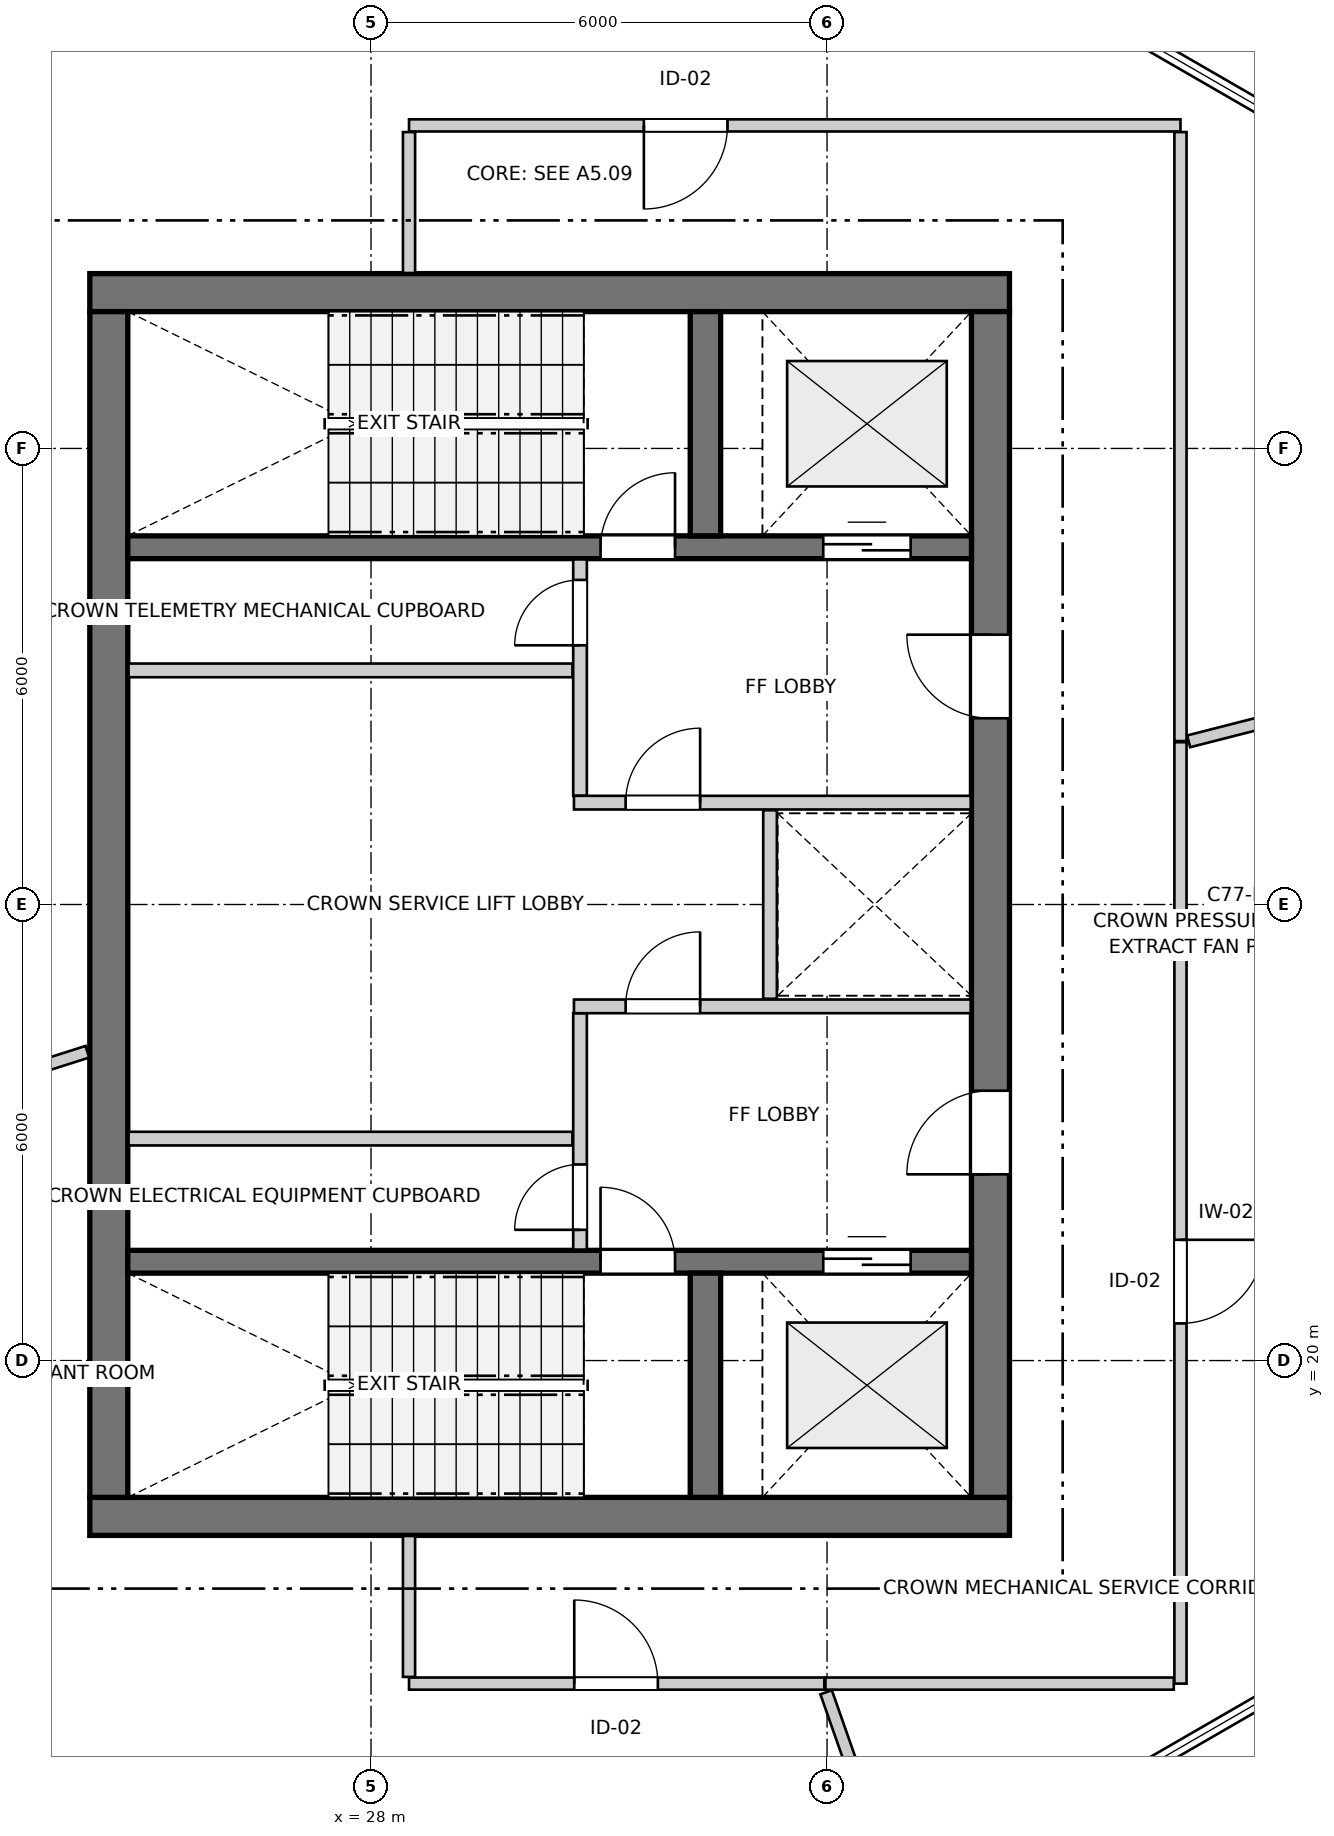
"""IFC4 building model, lengths in metres.
Left out: names, types, materials, properties, quantities, classifications, styles, units other than length and angle.
Written with IfcOpenShell. Run it as: python <this file> out.ifc"""

import sys

from ifc_helpers import new_model, si_unit, direction, frame, frame_2d, origin, place, context, subcontext, project, spatial, rectangle, extrude, source, transform, mapped, element, fill, save


model = new_model("IFC4")
c1 = context("Model", 3, precision=1e-05, world=origin(), true_north=direction((0.0, 1.0)))
c2 = subcontext(c1, "Body", "Model", "MODEL_VIEW")
j1 = project(units=[si_unit("LENGTHUNIT", "METRE"), si_unit("PLANEANGLEUNIT", "RADIAN")], contexts=[c1])
p1 = place(None, origin())
s1 = spatial("IfcSite", under=j1, at=p1, CompositionType="ELEMENT")
p2 = place(p1, origin())
s2 = spatial("IfcBuilding", under=s1, at=p2, CompositionType="ELEMENT")
p3 = place(p2, frame((0.0, 0.0, 257.5)))
s3 = spatial("IfcBuildingStorey", under=s2, at=p3, CompositionType="ELEMENT", Elevation=257.5)
for number, where, z_axis, x_axis in (
    (1, (24.3, 17.95, 0.0), (0.0, 0.0, 1.0), (1.0, 0.0, 0.0)),
    (2, (36.4, 34.05, 0.0), (0.0, 0.0, 1.0), (-1.0, 0.0, 0.0)),
):
    element("IfcWall", number, at=place(p3, frame(where, z_axis=z_axis, x_axis=x_axis)), inside=s3, PredefinedType="SHEAR", context=c2, shape_type="SweptSolid", body=[
        extrude(rectangle(XDim=12.1, YDim=0.5, at=frame_2d((6.05, 0.0))), origin(), (0.0, 0.0, 1.0), 4.05),
    ])
p4 = place(p3, frame((24.55, 33.8, 0.0), z_axis=(0.0, 0.0, 1.0), x_axis=(0.0, -1.0, 0.0)))
e3 = element("IfcWall", 3, at=p4, inside=s3, PredefinedType="SHEAR", context=c2, shape_type="SweptSolid", body=[
    extrude(rectangle(XDim=15.6, YDim=0.5, at=frame_2d((7.8, 0.0))), origin(), (0.0, 0.0, 1.0), 4.05),
])
p5 = place(p3, frame((36.15, 18.2, 0.0), z_axis=(0.0, 0.0, 1.0), x_axis=(0.0, 1.0, 0.0)))
e4 = element("IfcWall", 4, at=p5, inside=s3, PredefinedType="SHEAR", context=c2, shape_type="SweptSolid", body=[
    extrude(rectangle(XDim=15.6, YDim=0.5, at=frame_2d((7.8, 0.0))), origin(), (0.0, 0.0, 1.0), 4.05),
])
p6 = place(p5, frame((4.25, 0.0, 0.0)))
e5 = element("IfcOpeningElement", 5, at=p6, cuts=e4, PredefinedType="OPENING", context=c2, shape_type="SweptSolid", body=[
    extrude(rectangle(XDim=1.1, YDim=2.15, at=frame_2d((0.55, 1.075))), frame((0.0, 0.26, 0.0), z_axis=(0.0, -1.0, 0.0), x_axis=(1.0, 0.0, 0.0)), (0.0, 0.0, 1.0), 0.52),
])
p7 = place(p5, frame((10.25, 0.0, 0.0)))
e6 = element("IfcOpeningElement", 6, at=p7, cuts=e4, PredefinedType="OPENING", context=c2, shape_type="SweptSolid", body=[
    extrude(rectangle(XDim=1.1, YDim=2.15, at=frame_2d((0.55, 1.075))), frame((0.0, 0.26, 0.0), z_axis=(0.0, -1.0, 0.0), x_axis=(1.0, 0.0, 0.0)), (0.0, 0.0, 1.0), 0.52),
])
p8 = place(p3, frame((24.8, 21.3, 0.0), z_axis=(0.0, 0.0, 1.0), x_axis=(1.0, 0.0, 0.0)))
e7 = element("IfcWall", 7, at=p8, inside=s3, PredefinedType="SHEAR", context=c2, shape_type="SweptSolid", body=[
    extrude(rectangle(XDim=11.1, YDim=0.3, at=frame_2d((5.55, 0.0))), origin(), (0.0, 0.0, 1.0), 4.05),
])
p9 = place(p8, frame((6.22, 0.0, 0.0)))
e8 = element("IfcOpeningElement", 8, at=p9, cuts=e7, PredefinedType="OPENING", context=c2, shape_type="SweptSolid", body=[
    extrude(rectangle(XDim=0.98, YDim=2.15, at=frame_2d((0.49, 1.075))), frame((0.0, 0.16, 0.0), z_axis=(0.0, -1.0, 0.0), x_axis=(1.0, 0.0, 0.0)), (0.0, 0.0, 1.0), 0.32),
])
p10 = place(p8, frame((9.15, 0.0, 0.0)))
e9 = element("IfcOpeningElement", 9, at=p10, cuts=e7, PredefinedType="OPENING", context=c2, shape_type="SweptSolid", body=[
    extrude(rectangle(XDim=1.15, YDim=2.15, at=frame_2d((0.575, 1.075))), frame((0.0, 0.16, 0.0), z_axis=(0.0, -1.0, 0.0), x_axis=(1.0, 0.0, 0.0)), (0.0, 0.0, 1.0), 0.32),
])
p11 = place(p3, frame((32.4, 18.2, 0.0), z_axis=(0.0, 0.0, 1.0), x_axis=(0.0, 1.0, 0.0)))
e10 = element("IfcWall", 10, at=p11, inside=s3, PredefinedType="SHEAR", context=c2, shape_type="SweptSolid", body=[
    extrude(rectangle(XDim=2.95, YDim=0.4, at=frame_2d((1.475, 0.0))), origin(), (0.0, 0.0, 1.0), 4.05),
])
p12 = place(p3, frame((24.8, 30.7, 0.0), z_axis=(0.0, 0.0, 1.0), x_axis=(1.0, 0.0, 0.0)))
e11 = element("IfcWall", 11, at=p12, inside=s3, PredefinedType="SHEAR", context=c2, shape_type="SweptSolid", body=[
    extrude(rectangle(XDim=11.1, YDim=0.3, at=frame_2d((5.55, 0.0))), origin(), (0.0, 0.0, 1.0), 4.05),
])
p13 = place(p12, frame((6.22, 0.0, 0.0)))
e12 = element("IfcOpeningElement", 12, at=p13, cuts=e11, PredefinedType="OPENING", context=c2, shape_type="SweptSolid", body=[
    extrude(rectangle(XDim=0.98, YDim=2.15, at=frame_2d((0.49, 1.075))), frame((0.0, 0.16, 0.0), z_axis=(0.0, -1.0, 0.0), x_axis=(1.0, 0.0, 0.0)), (0.0, 0.0, 1.0), 0.32),
])
p14 = place(p12, frame((9.15, 0.0, 0.0)))
e13 = element("IfcOpeningElement", 13, at=p14, cuts=e11, PredefinedType="OPENING", context=c2, shape_type="SweptSolid", body=[
    extrude(rectangle(XDim=1.15, YDim=2.15, at=frame_2d((0.575, 1.075))), frame((0.0, 0.16, 0.0), z_axis=(0.0, -1.0, 0.0), x_axis=(1.0, 0.0, 0.0)), (0.0, 0.0, 1.0), 0.32),
])
p15 = place(p3, frame((32.4, 30.85, 0.0), z_axis=(0.0, 0.0, 1.0), x_axis=(0.0, 1.0, 0.0)))
e14 = element("IfcWall", 14, at=p15, inside=s3, PredefinedType="SHEAR", context=c2, shape_type="SweptSolid", body=[
    extrude(rectangle(XDim=2.95, YDim=0.4, at=frame_2d((1.475, 0.0))), origin(), (0.0, 0.0, 1.0), 4.05),
])
p16 = place(p3, frame((30.75, 21.46, 0.0), z_axis=(0.0, 0.0, 1.0), x_axis=(0.0, 1.0, 0.0)))
e15 = element("IfcWall", 15, at=p16, inside=s3, PredefinedType="PARTITIONING", context=c2, shape_type="SweptSolid", body=[
    extrude(rectangle(XDim=3.11, YDim=0.18, at=frame_2d((1.555, 0.0))), origin(), (0.0, 0.0, 1.0), 4.05),
])
p17 = place(p16, frame((0.26, 0.0, 0.0)))
e16 = element("IfcOpeningElement", 16, at=p17, cuts=e15, PredefinedType="OPENING", context=c2, shape_type="SweptSolid", body=[
    extrude(rectangle(XDim=0.86, YDim=2.05, at=frame_2d((0.43, 1.025))), frame((0.0, 0.1, 0.0), z_axis=(0.0, -1.0, 0.0), x_axis=(1.0, 0.0, 0.0)), (0.0, 0.0, 1.0), 0.2),
])
p18 = place(p3, frame((30.67, 24.66, 0.0), z_axis=(0.0, 0.0, 1.0), x_axis=(1.0, 0.0, 0.0)))
e17 = element("IfcWall", 17, at=p18, inside=s3, PredefinedType="PARTITIONING", context=c2, shape_type="SweptSolid", body=[
    extrude(rectangle(XDim=5.22, YDim=0.18, at=frame_2d((2.61, 0.0))), origin(), (0.0, 0.0, 1.0), 4.05),
])
p19 = place(p18, frame((0.68, 0.0, 0.0)))
e18 = element("IfcOpeningElement", 18, at=p19, cuts=e17, PredefinedType="OPENING", context=c2, shape_type="SweptSolid", body=[
    extrude(rectangle(XDim=0.98, YDim=2.15, at=frame_2d((0.49, 1.075))), frame((0.0, 0.1, 0.0), z_axis=(0.0, -1.0, 0.0), x_axis=(1.0, 0.0, 0.0)), (0.0, 0.0, 1.0), 0.2),
])
p20 = place(p3, frame((30.75, 27.43, 0.0), z_axis=(0.0, 0.0, 1.0), x_axis=(0.0, 1.0, 0.0)))
e19 = element("IfcWall", 19, at=p20, inside=s3, PredefinedType="PARTITIONING", context=c2, shape_type="SweptSolid", body=[
    extrude(rectangle(XDim=3.11, YDim=0.18, at=frame_2d((1.555, 0.0))), origin(), (0.0, 0.0, 1.0), 4.05),
])
p21 = place(p20, frame((1.98, 0.0, 0.0)))
e20 = element("IfcOpeningElement", 20, at=p21, cuts=e19, PredefinedType="OPENING", context=c2, shape_type="SweptSolid", body=[
    extrude(rectangle(XDim=0.86, YDim=2.05, at=frame_2d((0.43, 1.025))), frame((0.0, 0.1, 0.0), z_axis=(0.0, -1.0, 0.0), x_axis=(1.0, 0.0, 0.0)), (0.0, 0.0, 1.0), 0.2),
])
p22 = place(p3, frame((30.67, 27.34, 0.0), z_axis=(0.0, 0.0, 1.0), x_axis=(1.0, 0.0, 0.0)))
e21 = element("IfcWall", 21, at=p22, inside=s3, PredefinedType="PARTITIONING", context=c2, shape_type="SweptSolid", body=[
    extrude(rectangle(XDim=5.22, YDim=0.18, at=frame_2d((2.61, 0.0))), origin(), (0.0, 0.0, 1.0), 4.05),
])
p23 = place(p22, frame((0.68, 0.0, 0.0)))
e22 = element("IfcOpeningElement", 22, at=p23, cuts=e21, PredefinedType="OPENING", context=c2, shape_type="SweptSolid", body=[
    extrude(rectangle(XDim=0.98, YDim=2.15, at=frame_2d((0.49, 1.075))), frame((0.0, 0.1, 0.0), z_axis=(0.0, -1.0, 0.0), x_axis=(1.0, 0.0, 0.0)), (0.0, 0.0, 1.0), 0.2),
])
p24 = place(p3, frame((33.25, 24.76, 0.0), z_axis=(0.0, 0.0, 1.0), x_axis=(0.0, 1.0, 0.0)))
e23 = element("IfcWall", 23, at=p24, inside=s3, PredefinedType="PARTITIONING", context=c2, shape_type="SweptSolid", body=[
    extrude(rectangle(XDim=2.48, YDim=0.18, at=frame_2d((1.24, 0.0))), origin(), (0.0, 0.0, 1.0), 4.05),
])
for number, where, z_axis, x_axis in (
    (24, (24.81, 22.92, 0.0), (0.0, 0.0, 1.0), (1.0, 0.0, 0.0)),
    (25, (24.81, 29.08, 0.0), (0.0, 0.0, 1.0), (1.0, 0.0, 0.0)),
):
    element("IfcWall", number, at=place(p3, frame(where, z_axis=z_axis, x_axis=x_axis)), inside=s3, PredefinedType="PARTITIONING", context=c2, shape_type="SweptSolid", body=[
        extrude(rectangle(XDim=5.84, YDim=0.18, at=frame_2d((2.92, 0.0))), origin(), (0.0, 0.0, 1.0), 4.05),
    ])
p25 = place(p3, frame((38.65, 28.135, 0.0), z_axis=(0.0, 0.0, 1.0), x_axis=(0.0, -1.0, 0.0)))
e26 = element("IfcWall", 26, at=p25, inside=s3, PredefinedType="PARTITIONING", context=c2, shape_type="SweptSolid", body=[
    extrude(rectangle(XDim=12.385, YDim=0.16, at=frame_2d((6.192, 0.0))), origin(), (0.0, 0.0, 1.0), 4.05),
])
p26 = place(p25, frame((6.546, 0.0, 0.0)))
e27 = element("IfcOpeningElement", 27, at=p26, cuts=e26, PredefinedType="OPENING", context=c2, shape_type="SweptSolid", body=[
    extrude(rectangle(XDim=1.1, YDim=2.15, at=frame_2d((0.55, 1.075))), frame((0.0, 0.09, 0.0), z_axis=(0.0, -1.0, 0.0), x_axis=(1.0, 0.0, 0.0)), (0.0, 0.0, 1.0), 0.18),
])
p27 = place(p3, frame((38.65, 36.25, 0.0), z_axis=(0.0, 0.0, 1.0), x_axis=(-1.0, 0.0, 0.0)))
e28 = element("IfcWall", 28, at=p27, inside=s3, PredefinedType="PARTITIONING", context=c2, shape_type="SweptSolid", body=[
    extrude(rectangle(XDim=10.15, YDim=0.16, at=frame_2d((5.075, 0.0))), origin(), (0.0, 0.0, 1.0), 4.05),
])
p28 = place(p27, frame((5.96, 0.0, 0.0)))
e29 = element("IfcOpeningElement", 29, at=p28, cuts=e28, PredefinedType="OPENING", context=c2, shape_type="SweptSolid", body=[
    extrude(rectangle(XDim=1.1, YDim=2.15, at=frame_2d((0.55, 1.075))), frame((0.0, 0.09, 0.0), z_axis=(0.0, -1.0, 0.0), x_axis=(1.0, 0.0, 0.0)), (0.0, 0.0, 1.0), 0.18),
])
p29 = place(p3, frame((28.5, 15.75, 0.0), z_axis=(0.0, 0.0, 1.0), x_axis=(1.0, 0.0, 0.0)))
e30 = element("IfcWall", 30, at=p29, inside=s3, PredefinedType="PARTITIONING", context=c2, shape_type="SweptSolid", body=[
    extrude(rectangle(XDim=5.464, YDim=0.16, at=frame_2d((2.732, 0.0))), origin(), (0.0, 0.0, 1.0), 4.05),
])
p30 = place(p29, frame((2.174, 0.0, 0.0)))
e31 = element("IfcOpeningElement", 31, at=p30, cuts=e30, PredefinedType="OPENING", context=c2, shape_type="SweptSolid", body=[
    extrude(rectangle(XDim=1.1, YDim=2.15, at=frame_2d((0.55, 1.075))), frame((0.0, 0.09, 0.0), z_axis=(0.0, -1.0, 0.0), x_axis=(1.0, 0.0, 0.0)), (0.0, 0.0, 1.0), 0.18),
])
p31 = place(p3, frame((14.979, 21.103, 0.0), z_axis=(0.0, 0.0, 1.0), x_axis=(0.952804016236, 0.303586077818, 0.0)))
e32 = element("IfcWall", 32, at=p31, inside=s3, PredefinedType="PARTITIONING", context=c2, shape_type="SweptSolid", body=[
    extrude(rectangle(XDim=9.749, YDim=0.16, at=frame_2d((4.875, 0.0))), origin(), (0.0, 0.0, 1.0), 3.318),
])
p32 = place(p3, frame((38.65, 28.15, 0.0), z_axis=(0.0, 0.0, 1.0), x_axis=(0.0, 1.0, 0.0)))
e33 = element("IfcWall", 33, at=p32, inside=s3, PredefinedType="PARTITIONING", context=c2, shape_type="SweptSolid", body=[
    extrude(rectangle(XDim=8.012, YDim=0.16, at=frame_2d((4.006, 0.0))), origin(), (0.0, 0.0, 1.0), 4.05),
])
p33 = place(p3, frame((33.979, 15.75, 0.0), z_axis=(0.0, 0.0, 1.0), x_axis=(1.0, 0.0, 0.0)))
e34 = element("IfcWall", 34, at=p33, inside=s3, PredefinedType="PARTITIONING", context=c2, shape_type="SweptSolid", body=[
    extrude(rectangle(XDim=4.583, YDim=0.16, at=frame_2d((2.292, 0.0))), origin(), (0.0, 0.0, 1.0), 4.05),
])
p34 = place(p3, frame((33.988, 15.636, 0.0), z_axis=(0.0, 0.0, 1.0), x_axis=(0.331108156221, -0.943592808834, 0.0)))
e35 = element("IfcWall", 35, at=p34, inside=s3, PredefinedType="PARTITIONING", context=c2, shape_type="SweptSolid", body=[
    extrude(rectangle(XDim=2.985, YDim=0.16, at=frame_2d((1.492, 0.0))), origin(), (0.0, 0.0, 1.0), 4.05),
])
p35 = place(p3, frame((38.758, 28.146, 0.0), z_axis=(0.0, 0.0, 1.0), x_axis=(0.96888022142, 0.247530031594, 0.0)))
e36 = element("IfcWall", 36, at=p35, inside=s3, PredefinedType="PARTITIONING", context=c2, shape_type="SweptSolid", body=[
    extrude(rectangle(XDim=2.724, YDim=0.16, at=frame_2d((1.362, 0.0))), origin(), (0.0, 0.0, 1.0), 4.05),
])
for number, where, z_axis, x_axis in (
    (37, (28.5, 34.308, 0.0), (0.0, 0.0, 1.0), (0.0, 1.0, 0.0)),
    (38, (28.5, 15.838, 0.0), (0.0, 0.0, 1.0), (0.0, 1.0, 0.0)),
):
    element("IfcWall", number, at=place(p3, frame(where, z_axis=z_axis, x_axis=x_axis)), inside=s3, PredefinedType="PARTITIONING", context=c2, shape_type="SweptSolid", body=[
        extrude(rectangle(XDim=1.854, YDim=0.16, at=frame_2d((0.927, 0.0))), origin(), (0.0, 0.0, 1.0), 4.05),
    ])
m1 = source(origin(), c2, "Body", "SweptSolid", [
    extrude(rectangle(XDim=0.98, YDim=2.15, at=frame_2d((0.49, 1.075))), frame((0.0, 0.025, 0.0), z_axis=(0.0, -1.0, 0.0), x_axis=(1.0, 0.0, 0.0)), (0.0, 0.0, 1.0), 0.05),
])
p36 = place(p9, origin())
e39 = element("IfcDoor", 39, at=p36, inside=s3, OperationType="SINGLE_SWING_LEFT", PredefinedType="DOOR", context=c2, shape_type="MappedRepresentation", body=[
    mapped(m1, transform((0.0, 0.0, 0.0), x_axis=(1.0, 0.0, 0.0), y_axis=(0.0, 1.0, 0.0), z_axis=(0.0, 0.0, 1.0), scale=1.0)),
])
fill(e8, e39)
m2 = source(origin(), c2, "Body", "SweptSolid", [
    extrude(rectangle(XDim=1.15, YDim=2.15, at=frame_2d((0.575, 1.075))), frame((0.0, 0.025, 0.0), z_axis=(0.0, -1.0, 0.0), x_axis=(1.0, 0.0, 0.0)), (0.0, 0.0, 1.0), 0.05),
])
p37 = place(p10, origin())
e40 = element("IfcDoor", 40, at=p37, inside=s3, OperationType="DOUBLE_DOOR_SLIDING", PredefinedType="DOOR", context=c2, shape_type="MappedRepresentation", body=[
    mapped(m2, transform((0.0, 0.0, 0.0), x_axis=(1.0, 0.0, 0.0), y_axis=(0.0, 1.0, 0.0), z_axis=(0.0, 0.0, 1.0), scale=1.0)),
])
fill(e9, e40)
p38 = place(p13, origin())
e41 = element("IfcDoor", 41, at=p38, inside=s3, OperationType="SINGLE_SWING_RIGHT", PredefinedType="DOOR", context=c2, shape_type="MappedRepresentation", body=[
    mapped(m1, transform((0.0, 0.0, 0.0), x_axis=(1.0, 0.0, 0.0), y_axis=(0.0, 1.0, 0.0), z_axis=(0.0, 0.0, 1.0), scale=1.0)),
])
fill(e12, e41)
p39 = place(p14, origin())
e42 = element("IfcDoor", 42, at=p39, inside=s3, OperationType="DOUBLE_DOOR_SLIDING", PredefinedType="DOOR", context=c2, shape_type="MappedRepresentation", body=[
    mapped(m2, transform((0.0, 0.0, 0.0), x_axis=(1.0, 0.0, 0.0), y_axis=(0.0, 1.0, 0.0), z_axis=(0.0, 0.0, 1.0), scale=1.0)),
])
fill(e13, e42)
m3 = source(origin(), c2, "Body", "SweptSolid", [
    extrude(rectangle(XDim=1.1, YDim=2.15, at=frame_2d((0.55, 1.075))), frame((0.0, 0.025, 0.0), z_axis=(0.0, -1.0, 0.0), x_axis=(1.0, 0.0, 0.0)), (0.0, 0.0, 1.0), 0.05),
])
p40 = place(p6, origin())
e43 = element("IfcDoor", 43, at=p40, inside=s3, OperationType="SINGLE_SWING_LEFT", PredefinedType="DOOR", context=c2, shape_type="MappedRepresentation", body=[
    mapped(m3, transform((0.0, 0.0, 0.0), x_axis=(1.0, 0.0, 0.0), y_axis=(0.0, 1.0, 0.0), z_axis=(0.0, 0.0, 1.0), scale=1.0)),
])
fill(e5, e43)
p41 = place(p7, origin())
e44 = element("IfcDoor", 44, at=p41, inside=s3, OperationType="SINGLE_SWING_RIGHT", PredefinedType="DOOR", context=c2, shape_type="MappedRepresentation", body=[
    mapped(m3, transform((0.0, 0.0, 0.0), x_axis=(1.0, 0.0, 0.0), y_axis=(0.0, 1.0, 0.0), z_axis=(0.0, 0.0, 1.0), scale=1.0)),
])
fill(e6, e44)
m4 = source(origin(), c2, "Body", "SweptSolid", [
    extrude(rectangle(XDim=0.86, YDim=2.05, at=frame_2d((0.43, 1.025))), frame((0.0, 0.025, 0.0), z_axis=(0.0, -1.0, 0.0), x_axis=(1.0, 0.0, 0.0)), (0.0, 0.0, 1.0), 0.05),
])
p42 = place(p17, origin())
e45 = element("IfcDoor", 45, at=p42, inside=s3, OperationType="SINGLE_SWING_LEFT", PredefinedType="DOOR", context=c2, shape_type="MappedRepresentation", body=[
    mapped(m4, transform((0.0, 0.0, 0.0), x_axis=(1.0, 0.0, 0.0), y_axis=(0.0, 1.0, 0.0), z_axis=(0.0, 0.0, 1.0), scale=1.0)),
])
fill(e16, e45)
p43 = place(p19, origin())
e46 = element("IfcDoor", 46, at=p43, inside=s3, OperationType="SINGLE_SWING_RIGHT", PredefinedType="DOOR", context=c2, shape_type="MappedRepresentation", body=[
    mapped(m1, transform((0.0, 0.0, 0.0), x_axis=(1.0, 0.0, 0.0), y_axis=(0.0, 1.0, 0.0), z_axis=(0.0, 0.0, 1.0), scale=1.0)),
])
fill(e18, e46)
p44 = place(p21, origin())
e47 = element("IfcDoor", 47, at=p44, inside=s3, OperationType="SINGLE_SWING_LEFT", PredefinedType="DOOR", context=c2, shape_type="MappedRepresentation", body=[
    mapped(m4, transform((0.0, 0.0, 0.0), x_axis=(1.0, 0.0, 0.0), y_axis=(0.0, 1.0, 0.0), z_axis=(0.0, 0.0, 1.0), scale=1.0)),
])
fill(e20, e47)
p45 = place(p23, origin())
e48 = element("IfcDoor", 48, at=p45, inside=s3, OperationType="SINGLE_SWING_RIGHT", PredefinedType="DOOR", context=c2, shape_type="MappedRepresentation", body=[
    mapped(m1, transform((0.0, 0.0, 0.0), x_axis=(1.0, 0.0, 0.0), y_axis=(0.0, 1.0, 0.0), z_axis=(0.0, 0.0, 1.0), scale=1.0)),
])
fill(e22, e48)
p46 = place(p26, origin())
e49 = element("IfcDoor", 49, at=p46, inside=s3, OperationType="SINGLE_SWING_LEFT", PredefinedType="DOOR", context=c2, shape_type="MappedRepresentation", body=[
    mapped(m3, transform((0.0, 0.0, 0.0), x_axis=(1.0, 0.0, 0.0), y_axis=(0.0, 1.0, 0.0), z_axis=(0.0, 0.0, 1.0), scale=1.0)),
])
fill(e27, e49)
p47 = place(p28, origin())
e50 = element("IfcDoor", 50, at=p47, inside=s3, OperationType="SINGLE_SWING_RIGHT", PredefinedType="DOOR", context=c2, shape_type="MappedRepresentation", body=[
    mapped(m3, transform((0.0, 0.0, 0.0), x_axis=(1.0, 0.0, 0.0), y_axis=(0.0, 1.0, 0.0), z_axis=(0.0, 0.0, 1.0), scale=1.0)),
])
fill(e29, e50)
p48 = place(p30, origin())
e51 = element("IfcDoor", 51, at=p48, inside=s3, OperationType="SINGLE_SWING_LEFT", PredefinedType="DOOR", context=c2, shape_type="MappedRepresentation", body=[
    mapped(m3, transform((0.0, 0.0, 0.0), x_axis=(1.0, 0.0, 0.0), y_axis=(0.0, 1.0, 0.0), z_axis=(0.0, 0.0, 1.0), scale=1.0)),
])
fill(e31, e51)
save(model, sys.argv[1])
